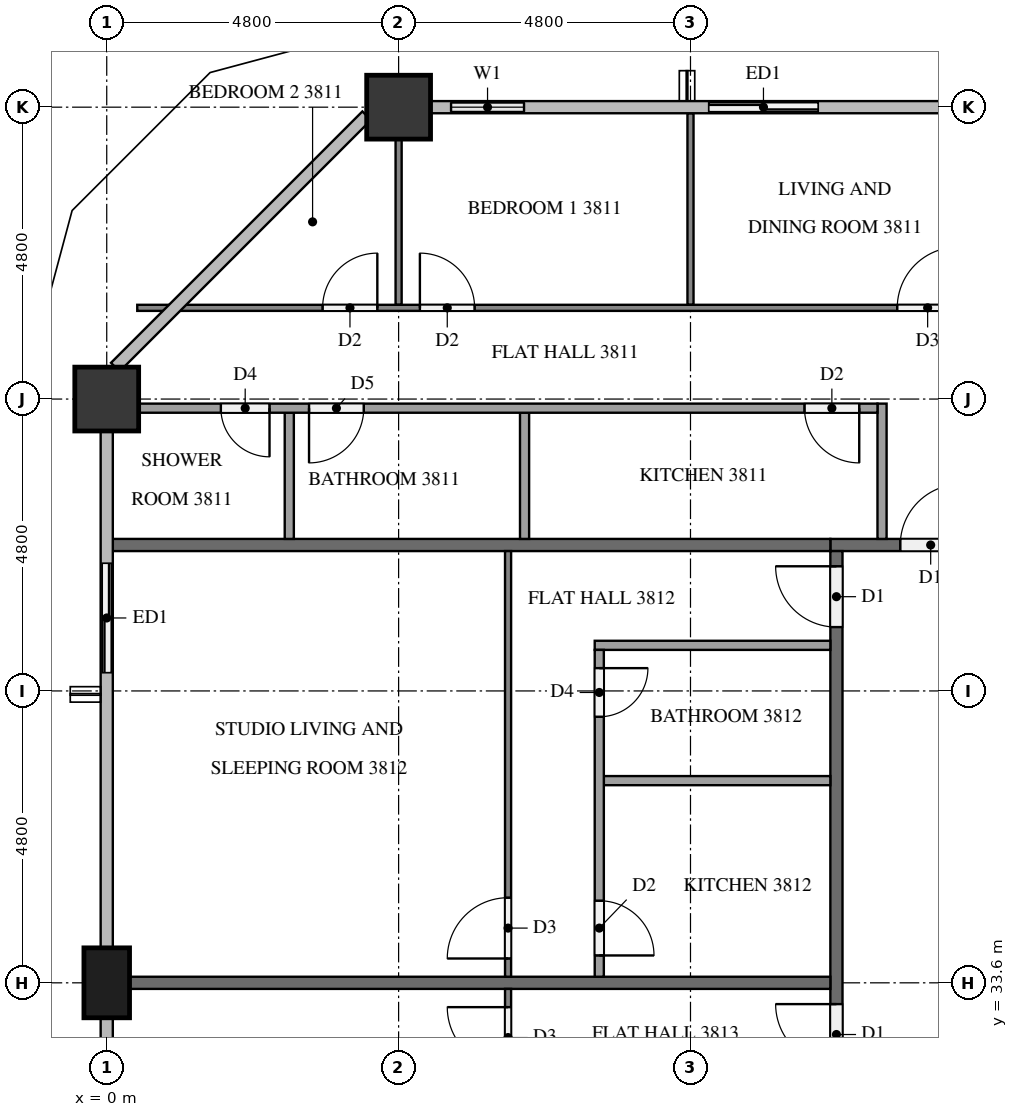
"""IFC4 building model, lengths in metres.
Left out: names, types, materials, properties, quantities, classifications, styles, units other than length and angle.
Written with IfcOpenShell. Run it as: python <this file> out.ifc"""

import sys

from ifc_helpers import new_model, si_unit, direction, frame, frame_2d, origin, origin_2d, place, context, subcontext, project, spatial, rectangle, extrude, element, fill, save


model = new_model("IFC4")
c1 = context("Model", 3, precision=1e-05, world=origin(), true_north=direction((0.0, 1.0)))
c2 = subcontext(c1, "Body", "Model", "MODEL_VIEW")
j1 = project(units=[si_unit("LENGTHUNIT", "METRE"), si_unit("PLANEANGLEUNIT", "RADIAN")], contexts=[c1])
p1 = place(None, origin())
s1 = spatial("IfcSite", under=j1, at=p1, CompositionType="ELEMENT")
p2 = place(p1, origin())
s2 = spatial("IfcBuilding", under=s1, at=p2, CompositionType="ELEMENT")
p3 = place(p2, frame((0.0, 0.0, 149.0)))
s3 = spatial("IfcBuildingStorey", under=s2, at=p3, CompositionType="ELEMENT", Elevation=149.0)
for number, where, z_axis, x_axis in (
    (1, (4.8, 48.0, 0.0), (0.0, 0.0, 1.0), (1.0, 0.0, 0.0)),
    (2, (0.0, 43.2, 0.0), (0.0, 0.0, 1.0), (1.0, 0.0, 0.0)),
):
    element("IfcColumn", number, at=place(p3, frame(where, z_axis=z_axis, x_axis=x_axis)), inside=s3, PredefinedType="COLUMN", context=c2, shape_type="SweptSolid", body=[
        extrude(rectangle(XDim=1.05, YDim=1.05, at=origin_2d()), origin(), (0.0, 0.0, 1.0), 3.2),
    ])
p4 = place(p3, frame((0.0, 33.6, 0.0), z_axis=(0.0, 0.0, 1.0), x_axis=(0.0, 1.0, 0.0)))
e3 = element("IfcColumn", 3, at=p4, inside=s3, PredefinedType="COLUMN", context=c2, shape_type="SweptSolid", body=[
    extrude(rectangle(XDim=1.15, YDim=0.75, at=origin_2d()), origin(), (0.0, 0.0, 1.0), 3.2),
])
p5 = place(p3, frame((12.0, 48.0, 0.0), z_axis=(0.0, 0.0, 1.0), x_axis=(-1.0, 0.0, 0.0)))
e4 = element("IfcWall", 4, at=p5, inside=s3, PredefinedType="SOLIDWALL", context=c2, shape_type="SweptSolid", body=[
    extrude(rectangle(XDim=2.4, YDim=0.15, at=frame_2d((1.2, 0.0))), origin(), (0.0, 0.0, 1.0), 3.2),
])
p6 = place(p5, frame((0.3, 0.0, 0.0)))
e5 = element("IfcOpeningElement", 5, at=p6, cuts=e4, PredefinedType="OPENING", context=c2, shape_type="SweptSolid", body=[
    extrude(rectangle(XDim=1.8, YDim=2.4, at=frame_2d((0.9, 1.2))), frame((0.0, 0.085, 0.0), z_axis=(0.0, -1.0, 0.0), x_axis=(1.0, 0.0, 0.0)), (0.0, 0.0, 1.0), 0.17),
])
p7 = place(p3, frame((7.2, 48.0, 0.0), z_axis=(0.0, 0.0, 1.0), x_axis=(-1.0, 0.0, 0.0)))
e6 = element("IfcWall", 6, at=p7, inside=s3, PredefinedType="SOLIDWALL", context=c2, shape_type="SweptSolid", body=[
    extrude(rectangle(XDim=1.875, YDim=0.15, at=frame_2d((0.938, 0.0))), origin(), (0.0, 0.0, 1.0), 3.2),
])
p8 = place(p7, frame((0.337, 0.0, 0.9)))
e7 = element("IfcOpeningElement", 7, at=p8, cuts=e6, PredefinedType="OPENING", context=c2, shape_type="SweptSolid", body=[
    extrude(rectangle(XDim=1.2, YDim=1.4, at=frame_2d((0.6, 0.7))), frame((0.0, 0.085, 0.0), z_axis=(0.0, -1.0, 0.0), x_axis=(1.0, 0.0, 0.0)), (0.0, 0.0, 1.0), 0.17),
])
p9 = place(p3, frame((0.0, 40.8, 0.0), z_axis=(0.0, 0.0, 1.0), x_axis=(0.0, -1.0, 0.0)))
e8 = element("IfcWall", 8, at=p9, inside=s3, PredefinedType="SOLIDWALL", context=c2, shape_type="SweptSolid", body=[
    extrude(rectangle(XDim=2.4, YDim=0.15, at=frame_2d((1.2, 0.0))), origin(), (0.0, 0.0, 1.0), 3.2),
])
p10 = place(p9, frame((0.3, 0.0, 0.0)))
e9 = element("IfcOpeningElement", 9, at=p10, cuts=e8, PredefinedType="OPENING", context=c2, shape_type="SweptSolid", body=[
    extrude(rectangle(XDim=1.8, YDim=2.4, at=frame_2d((0.9, 1.2))), frame((0.0, 0.085, 0.0), z_axis=(0.0, -1.0, 0.0), x_axis=(1.0, 0.0, 0.0)), (0.0, 0.0, 1.0), 0.17),
])
p11 = place(p3, frame((11.9, 40.8, 0.0), z_axis=(0.0, 0.0, 1.0), x_axis=(1.0, 0.0, 0.0)))
e10 = element("IfcWall", 10, at=p11, inside=s3, PredefinedType="PARTITIONING", context=c2, shape_type="SweptSolid", body=[
    extrude(rectangle(XDim=38.6, YDim=0.2, at=frame_2d((19.3, 0.0))), origin(), (0.0, 0.0, 1.0), 3.2),
])
p12 = place(p11, frame((31.65, 0.0, 0.0)))
e11 = element("IfcOpeningElement", 11, at=p12, cuts=e10, PredefinedType="OPENING", context=c2, shape_type="SweptSolid", body=[
    extrude(rectangle(XDim=1.0, YDim=2.1, at=frame_2d((0.5, 1.05))), frame((0.0, 0.11, 0.0), z_axis=(0.0, -1.0, 0.0), x_axis=(1.0, 0.0, 0.0)), (0.0, 0.0, 1.0), 0.22),
])
p13 = place(p11, frame((29.95, 0.0, 0.0)))
e12 = element("IfcOpeningElement", 12, at=p13, cuts=e10, PredefinedType="OPENING", context=c2, shape_type="SweptSolid", body=[
    extrude(rectangle(XDim=1.0, YDim=2.1, at=frame_2d((0.5, 1.05))), frame((0.0, 0.11, 0.0), z_axis=(0.0, -1.0, 0.0), x_axis=(1.0, 0.0, 0.0)), (0.0, 0.0, 1.0), 0.22),
])
p14 = place(p11, frame((15.55, 0.0, 0.0)))
e13 = element("IfcOpeningElement", 13, at=p14, cuts=e10, PredefinedType="OPENING", context=c2, shape_type="SweptSolid", body=[
    extrude(rectangle(XDim=1.0, YDim=2.1, at=frame_2d((0.5, 1.05))), frame((0.0, 0.11, 0.0), z_axis=(0.0, -1.0, 0.0), x_axis=(1.0, 0.0, 0.0)), (0.0, 0.0, 1.0), 0.22),
])
p15 = place(p11, frame((1.15, 0.0, 0.0)))
e14 = element("IfcOpeningElement", 14, at=p15, cuts=e10, PredefinedType="OPENING", context=c2, shape_type="SweptSolid", body=[
    extrude(rectangle(XDim=1.0, YDim=2.1, at=frame_2d((0.5, 1.05))), frame((0.0, 0.11, 0.0), z_axis=(0.0, -1.0, 0.0), x_axis=(1.0, 0.0, 0.0)), (0.0, 0.0, 1.0), 0.22),
])
p16 = place(p3, frame((12.0, 12.1, 0.0), z_axis=(0.0, 0.0, 1.0), x_axis=(0.0, 1.0, 0.0)))
e15 = element("IfcWall", 15, at=p16, inside=s3, PredefinedType="PARTITIONING", context=c2, shape_type="SweptSolid", body=[
    extrude(rectangle(XDim=28.6, YDim=0.2, at=frame_2d((14.3, 0.0))), origin(), (0.0, 0.0, 1.0), 3.2),
])
p17 = place(p16, frame((27.35, 0.0, 0.0)))
e16 = element("IfcOpeningElement", 16, at=p17, cuts=e15, PredefinedType="OPENING", context=c2, shape_type="SweptSolid", body=[
    extrude(rectangle(XDim=1.0, YDim=2.1, at=frame_2d((0.5, 1.05))), frame((0.0, 0.11, 0.0), z_axis=(0.0, -1.0, 0.0), x_axis=(1.0, 0.0, 0.0)), (0.0, 0.0, 1.0), 0.22),
])
p18 = place(p16, frame((20.15, 0.0, 0.0)))
e17 = element("IfcOpeningElement", 17, at=p18, cuts=e15, PredefinedType="OPENING", context=c2, shape_type="SweptSolid", body=[
    extrude(rectangle(XDim=1.0, YDim=2.1, at=frame_2d((0.5, 1.05))), frame((0.0, 0.11, 0.0), z_axis=(0.0, -1.0, 0.0), x_axis=(1.0, 0.0, 0.0)), (0.0, 0.0, 1.0), 0.22),
])
p19 = place(p16, frame((10.55, 0.0, 0.0)))
e18 = element("IfcOpeningElement", 18, at=p19, cuts=e15, PredefinedType="OPENING", context=c2, shape_type="SweptSolid", body=[
    extrude(rectangle(XDim=1.0, YDim=2.1, at=frame_2d((0.5, 1.05))), frame((0.0, 0.11, 0.0), z_axis=(0.0, -1.0, 0.0), x_axis=(1.0, 0.0, 0.0)), (0.0, 0.0, 1.0), 0.22),
])
p20 = place(p3, frame((0.1, 40.8, 0.0), z_axis=(0.0, 0.0, 1.0), x_axis=(1.0, 0.0, 0.0)))
e19 = element("IfcWall", 19, at=p20, inside=s3, PredefinedType="PARTITIONING", context=c2, shape_type="SweptSolid", body=[
    extrude(rectangle(XDim=11.8, YDim=0.2, at=frame_2d((5.9, 0.0))), origin(), (0.0, 0.0, 1.0), 3.2),
])
p21 = place(p3, frame((0.375, 33.6, 0.0), z_axis=(0.0, 0.0, 1.0), x_axis=(1.0, 0.0, 0.0)))
e20 = element("IfcWall", 20, at=p21, inside=s3, PredefinedType="PARTITIONING", context=c2, shape_type="SweptSolid", body=[
    extrude(rectangle(XDim=11.525, YDim=0.2, at=frame_2d((5.762, 0.0))), origin(), (0.0, 0.0, 1.0), 3.2),
])
p22 = place(p3, frame((9.6, 44.75, 0.0), z_axis=(0.0, 0.0, 1.0), x_axis=(0.0, 1.0, 0.0)))
e21 = element("IfcWall", 21, at=p22, inside=s3, PredefinedType="PARTITIONING", context=c2, shape_type="SweptSolid", body=[
    extrude(rectangle(XDim=3.15, YDim=0.1, at=frame_2d((1.575, 0.0))), origin(), (0.0, 0.0, 1.0), 3.2),
])
p23 = place(p3, frame((4.8, 44.75, 0.0), z_axis=(0.0, 0.0, 1.0), x_axis=(0.0, 1.0, 0.0)))
e22 = element("IfcWall", 22, at=p23, inside=s3, PredefinedType="PARTITIONING", context=c2, shape_type="SweptSolid", body=[
    extrude(rectangle(XDim=2.725, YDim=0.1, at=frame_2d((1.363, 0.0))), origin(), (0.0, 0.0, 1.0), 3.2),
])
p24 = place(p3, frame((0.502, 44.7, 0.0), z_axis=(0.0, 0.0, 1.0), x_axis=(1.0, 0.0, 0.0)))
e23 = element("IfcWall", 23, at=p24, inside=s3, PredefinedType="PARTITIONING", context=c2, shape_type="SweptSolid", body=[
    extrude(rectangle(XDim=13.798, YDim=0.1, at=frame_2d((6.899, 0.0))), origin(), (0.0, 0.0, 1.0), 3.2),
])
p25 = place(p24, frame((12.498, 0.0, 0.0)))
e24 = element("IfcOpeningElement", 24, at=p25, cuts=e23, PredefinedType="OPENING", context=c2, shape_type="SweptSolid", body=[
    extrude(rectangle(XDim=1.0, YDim=2.1, at=frame_2d((0.5, 1.05))), frame((0.0, 0.06, 0.0), z_axis=(0.0, -1.0, 0.0), x_axis=(1.0, 0.0, 0.0)), (0.0, 0.0, 1.0), 0.12),
])
p26 = place(p24, frame((4.648, 0.0, 0.0)))
e25 = element("IfcOpeningElement", 25, at=p26, cuts=e23, PredefinedType="OPENING", context=c2, shape_type="SweptSolid", body=[
    extrude(rectangle(XDim=0.9, YDim=2.1, at=frame_2d((0.45, 1.05))), frame((0.0, 0.06, 0.0), z_axis=(0.0, -1.0, 0.0), x_axis=(1.0, 0.0, 0.0)), (0.0, 0.0, 1.0), 0.12),
])
p27 = place(p24, frame((3.048, 0.0, 0.0)))
e26 = element("IfcOpeningElement", 26, at=p27, cuts=e23, PredefinedType="OPENING", context=c2, shape_type="SweptSolid", body=[
    extrude(rectangle(XDim=0.9, YDim=2.1, at=frame_2d((0.45, 1.05))), frame((0.0, 0.06, 0.0), z_axis=(0.0, -1.0, 0.0), x_axis=(1.0, 0.0, 0.0)), (0.0, 0.0, 1.0), 0.12),
])
for number, where, z_axis, x_axis in (
    (27, (6.871, 40.9, 0.0), (0.0, 0.0, 1.0), (0.0, 1.0, 0.0)),
    (28, (3.002, 40.9, 0.0), (0.0, 0.0, 1.0), (0.0, 1.0, 0.0)),
):
    element("IfcWall", number, at=place(p3, frame(where, z_axis=z_axis, x_axis=x_axis)), inside=s3, PredefinedType="PARTITIONING", context=c2, shape_type="SweptSolid", body=[
        extrude(rectangle(XDim=2.075, YDim=0.15, at=frame_2d((1.038, 0.0))), origin(), (0.0, 0.0, 1.0), 3.2),
    ])
p28 = place(p3, frame((12.75, 40.9, 0.0), z_axis=(0.0, 0.0, 1.0), x_axis=(0.0, 1.0, 0.0)))
e29 = element("IfcWall", 29, at=p28, inside=s3, PredefinedType="PARTITIONING", context=c2, shape_type="SweptSolid", body=[
    extrude(rectangle(XDim=2.225, YDim=0.15, at=frame_2d((1.113, 0.0))), origin(), (0.0, 0.0, 1.0), 3.2),
])
p29 = place(p3, frame((12.675, 43.05, 0.0), z_axis=(0.0, 0.0, 1.0), x_axis=(-1.0, 0.0, 0.0)))
e30 = element("IfcWall", 30, at=p29, inside=s3, PredefinedType="PARTITIONING", context=c2, shape_type="SweptSolid", body=[
    extrude(rectangle(XDim=12.15, YDim=0.15, at=frame_2d((6.075, 0.0))), origin(), (0.0, 0.0, 1.0), 3.2),
])
p30 = place(p29, frame((0.3, 0.0, 0.0)))
e31 = element("IfcOpeningElement", 31, at=p30, cuts=e30, PredefinedType="OPENING", context=c2, shape_type="SweptSolid", body=[
    extrude(rectangle(XDim=0.9, YDim=2.1, at=frame_2d((0.45, 1.05))), frame((0.0, 0.085, 0.0), z_axis=(0.0, -1.0, 0.0), x_axis=(1.0, 0.0, 0.0)), (0.0, 0.0, 1.0), 0.17),
])
p31 = place(p29, frame((8.448, 0.0, 0.0)))
e32 = element("IfcOpeningElement", 32, at=p31, cuts=e30, PredefinedType="OPENING", context=c2, shape_type="SweptSolid", body=[
    extrude(rectangle(XDim=0.9, YDim=2.1, at=frame_2d((0.45, 1.05))), frame((0.0, 0.085, 0.0), z_axis=(0.0, -1.0, 0.0), x_axis=(1.0, 0.0, 0.0)), (0.0, 0.0, 1.0), 0.17),
])
p32 = place(p29, frame((9.998, 0.0, 0.0)))
e33 = element("IfcOpeningElement", 33, at=p32, cuts=e30, PredefinedType="OPENING", context=c2, shape_type="SweptSolid", body=[
    extrude(rectangle(XDim=0.8, YDim=2.1, at=frame_2d((0.4, 1.05))), frame((0.0, 0.085, 0.0), z_axis=(0.0, -1.0, 0.0), x_axis=(1.0, 0.0, 0.0)), (0.0, 0.0, 1.0), 0.17),
])
p33 = place(p3, frame((6.6, 33.7, 0.0), z_axis=(0.0, 0.0, 1.0), x_axis=(0.0, 1.0, 0.0)))
e34 = element("IfcWall", 34, at=p33, inside=s3, PredefinedType="PARTITIONING", context=c2, shape_type="SweptSolid", body=[
    extrude(rectangle(XDim=7.0, YDim=0.1, at=frame_2d((3.5, 0.0))), origin(), (0.0, 0.0, 1.0), 3.2),
])
p34 = place(p33, frame((0.3, 0.0, 0.0)))
e35 = element("IfcOpeningElement", 35, at=p34, cuts=e34, PredefinedType="OPENING", context=c2, shape_type="SweptSolid", body=[
    extrude(rectangle(XDim=1.0, YDim=2.1, at=frame_2d((0.5, 1.05))), frame((0.0, 0.06, 0.0), z_axis=(0.0, -1.0, 0.0), x_axis=(1.0, 0.0, 0.0)), (0.0, 0.0, 1.0), 0.12),
])
p35 = place(p3, frame((11.9, 36.925, 0.0), z_axis=(0.0, 0.0, 1.0), x_axis=(-1.0, 0.0, 0.0)))
e36 = element("IfcWall", 36, at=p35, inside=s3, PredefinedType="PARTITIONING", context=c2, shape_type="SweptSolid", body=[
    extrude(rectangle(XDim=3.725, YDim=0.15, at=frame_2d((1.862, 0.0))), origin(), (0.0, 0.0, 1.0), 3.2),
])
p36 = place(p3, frame((11.9, 39.15, 0.0), z_axis=(0.0, 0.0, 1.0), x_axis=(-1.0, 0.0, 0.0)))
e37 = element("IfcWall", 37, at=p36, inside=s3, PredefinedType="PARTITIONING", context=c2, shape_type="SweptSolid", body=[
    extrude(rectangle(XDim=3.875, YDim=0.15, at=frame_2d((1.938, 0.0))), origin(), (0.0, 0.0, 1.0), 3.2),
])
p37 = place(p3, frame((8.1, 39.075, 0.0), z_axis=(0.0, 0.0, 1.0), x_axis=(0.0, -1.0, 0.0)))
e38 = element("IfcWall", 38, at=p37, inside=s3, PredefinedType="PARTITIONING", context=c2, shape_type="SweptSolid", body=[
    extrude(rectangle(XDim=5.375, YDim=0.15, at=frame_2d((2.688, 0.0))), origin(), (0.0, 0.0, 1.0), 3.2),
])
p38 = place(p37, frame((0.3, 0.0, 0.0)))
e39 = element("IfcOpeningElement", 39, at=p38, cuts=e38, PredefinedType="OPENING", context=c2, shape_type="SweptSolid", body=[
    extrude(rectangle(XDim=0.8, YDim=2.1, at=frame_2d((0.4, 1.05))), frame((0.0, 0.085, 0.0), z_axis=(0.0, -1.0, 0.0), x_axis=(1.0, 0.0, 0.0)), (0.0, 0.0, 1.0), 0.17),
])
p39 = place(p37, frame((4.125, 0.0, 0.0)))
e40 = element("IfcOpeningElement", 40, at=p39, cuts=e38, PredefinedType="OPENING", context=c2, shape_type="SweptSolid", body=[
    extrude(rectangle(XDim=0.9, YDim=2.1, at=frame_2d((0.45, 1.05))), frame((0.0, 0.085, 0.0), z_axis=(0.0, -1.0, 0.0), x_axis=(1.0, 0.0, 0.0)), (0.0, 0.0, 1.0), 0.17),
])
p40 = place(p3, frame((6.6, 24.1, 0.0), z_axis=(0.0, 0.0, 1.0), x_axis=(0.0, 1.0, 0.0)))
e41 = element("IfcWall", 41, at=p40, inside=s3, PredefinedType="PARTITIONING", context=c2, shape_type="SweptSolid", body=[
    extrude(rectangle(XDim=9.4, YDim=0.1, at=frame_2d((4.7, 0.0))), origin(), (0.0, 0.0, 1.0), 3.2),
])
p41 = place(p40, frame((8.1, 0.0, 0.0)))
e42 = element("IfcOpeningElement", 42, at=p41, cuts=e41, PredefinedType="OPENING", context=c2, shape_type="SweptSolid", body=[
    extrude(rectangle(XDim=1.0, YDim=2.1, at=frame_2d((0.5, 1.05))), frame((0.0, 0.06, 0.0), z_axis=(0.0, -1.0, 0.0), x_axis=(1.0, 0.0, 0.0)), (0.0, 0.0, 1.0), 0.12),
])
p42 = place(p40, frame((0.3, 0.0, 0.0)))
e43 = element("IfcOpeningElement", 43, at=p42, cuts=e41, PredefinedType="OPENING", context=c2, shape_type="SweptSolid", body=[
    extrude(rectangle(XDim=0.9, YDim=2.1, at=frame_2d((0.45, 1.05))), frame((0.0, 0.06, 0.0), z_axis=(0.0, -1.0, 0.0), x_axis=(1.0, 0.0, 0.0)), (0.0, 0.0, 1.0), 0.12),
])
p43 = place(p6, origin())
e44 = element("IfcDoor", 44, at=p43, inside=s3, OperationType="SLIDING_TO_RIGHT", PredefinedType="DOOR", context=c2, shape_type="SweptSolid", body=[
    extrude(rectangle(XDim=1.8, YDim=2.4, at=frame_2d((0.9, 1.2))), frame((0.0, 0.025, 0.0), z_axis=(0.0, -1.0, 0.0), x_axis=(1.0, 0.0, 0.0)), (0.0, 0.0, 1.0), 0.05),
])
fill(e5, e44)
p44 = place(p8, origin())
e45 = element("IfcWindow", 45, at=p44, inside=s3, PartitioningType="SINGLE_PANEL", PredefinedType="WINDOW", context=c2, shape_type="SweptSolid", body=[
    extrude(rectangle(XDim=1.2, YDim=1.4, at=frame_2d((0.6, 0.7))), frame((0.0, 0.03, 0.0), z_axis=(0.0, -1.0, 0.0), x_axis=(1.0, 0.0, 0.0)), (0.0, 0.0, 1.0), 0.06),
])
fill(e7, e45)
p45 = place(p10, origin())
e46 = element("IfcDoor", 46, at=p45, inside=s3, OperationType="SLIDING_TO_LEFT", PredefinedType="DOOR", context=c2, shape_type="SweptSolid", body=[
    extrude(rectangle(XDim=1.8, YDim=2.4, at=frame_2d((0.9, 1.2))), frame((0.0, 0.025, 0.0), z_axis=(0.0, -1.0, 0.0), x_axis=(1.0, 0.0, 0.0)), (0.0, 0.0, 1.0), 0.05),
])
fill(e9, e46)
p46 = place(p15, origin())
e47 = element("IfcDoor", 47, at=p46, inside=s3, OperationType="SINGLE_SWING_RIGHT", PredefinedType="DOOR", context=c2, shape_type="SweptSolid", body=[
    extrude(rectangle(XDim=1.0, YDim=2.1, at=frame_2d((0.5, 1.05))), frame((0.0, 0.025, 0.0), z_axis=(0.0, -1.0, 0.0), x_axis=(1.0, 0.0, 0.0)), (0.0, 0.0, 1.0), 0.05),
])
fill(e14, e47)
p47 = place(p17, origin())
e48 = element("IfcDoor", 48, at=p47, inside=s3, OperationType="SINGLE_SWING_RIGHT", PredefinedType="DOOR", context=c2, shape_type="SweptSolid", body=[
    extrude(rectangle(XDim=1.0, YDim=2.1, at=frame_2d((0.5, 1.05))), frame((0.0, 0.025, 0.0), z_axis=(0.0, -1.0, 0.0), x_axis=(1.0, 0.0, 0.0)), (0.0, 0.0, 1.0), 0.05),
])
fill(e16, e48)
p48 = place(p18, origin())
e49 = element("IfcDoor", 49, at=p48, inside=s3, OperationType="SINGLE_SWING_RIGHT", PredefinedType="DOOR", context=c2, shape_type="SweptSolid", body=[
    extrude(rectangle(XDim=1.0, YDim=2.1, at=frame_2d((0.5, 1.05))), frame((0.0, 0.025, 0.0), z_axis=(0.0, -1.0, 0.0), x_axis=(1.0, 0.0, 0.0)), (0.0, 0.0, 1.0), 0.05),
])
fill(e17, e49)
p49 = place(p25, origin())
e50 = element("IfcDoor", 50, at=p49, inside=s3, OperationType="SINGLE_SWING_RIGHT", PredefinedType="DOOR", context=c2, shape_type="SweptSolid", body=[
    extrude(rectangle(XDim=1.0, YDim=2.1, at=frame_2d((0.5, 1.05))), frame((0.0, 0.025, 0.0), z_axis=(0.0, -1.0, 0.0), x_axis=(1.0, 0.0, 0.0)), (0.0, 0.0, 1.0), 0.05),
])
fill(e24, e50)
p50 = place(p26, origin())
e51 = element("IfcDoor", 51, at=p50, inside=s3, OperationType="SINGLE_SWING_LEFT", PredefinedType="DOOR", context=c2, shape_type="SweptSolid", body=[
    extrude(rectangle(XDim=0.9, YDim=2.1, at=frame_2d((0.45, 1.05))), frame((0.0, 0.025, 0.0), z_axis=(0.0, -1.0, 0.0), x_axis=(1.0, 0.0, 0.0)), (0.0, 0.0, 1.0), 0.05),
])
fill(e25, e51)
p51 = place(p27, origin())
e52 = element("IfcDoor", 52, at=p51, inside=s3, OperationType="SINGLE_SWING_RIGHT", PredefinedType="DOOR", context=c2, shape_type="SweptSolid", body=[
    extrude(rectangle(XDim=0.9, YDim=2.1, at=frame_2d((0.45, 1.05))), frame((0.0, 0.025, 0.0), z_axis=(0.0, -1.0, 0.0), x_axis=(1.0, 0.0, 0.0)), (0.0, 0.0, 1.0), 0.05),
])
fill(e26, e52)
p52 = place(p30, origin())
e53 = element("IfcDoor", 53, at=p52, inside=s3, OperationType="SINGLE_SWING_LEFT", PredefinedType="DOOR", context=c2, shape_type="SweptSolid", body=[
    extrude(rectangle(XDim=0.9, YDim=2.1, at=frame_2d((0.45, 1.05))), frame((0.0, 0.025, 0.0), z_axis=(0.0, -1.0, 0.0), x_axis=(1.0, 0.0, 0.0)), (0.0, 0.0, 1.0), 0.05),
])
fill(e31, e53)
p53 = place(p31, origin())
e54 = element("IfcDoor", 54, at=p53, inside=s3, OperationType="SINGLE_SWING_RIGHT", PredefinedType="DOOR", context=c2, shape_type="SweptSolid", body=[
    extrude(rectangle(XDim=0.9, YDim=2.1, at=frame_2d((0.45, 1.05))), frame((0.0, 0.025, 0.0), z_axis=(0.0, -1.0, 0.0), x_axis=(1.0, 0.0, 0.0)), (0.0, 0.0, 1.0), 0.05),
])
fill(e32, e54)
p54 = place(p32, origin())
e55 = element("IfcDoor", 55, at=p54, inside=s3, OperationType="SINGLE_SWING_LEFT", PredefinedType="DOOR", context=c2, shape_type="SweptSolid", body=[
    extrude(rectangle(XDim=0.8, YDim=2.1, at=frame_2d((0.4, 1.05))), frame((0.0, 0.025, 0.0), z_axis=(0.0, -1.0, 0.0), x_axis=(1.0, 0.0, 0.0)), (0.0, 0.0, 1.0), 0.05),
])
fill(e33, e55)
p55 = place(p34, origin())
e56 = element("IfcDoor", 56, at=p55, inside=s3, OperationType="SINGLE_SWING_LEFT", PredefinedType="DOOR", context=c2, shape_type="SweptSolid", body=[
    extrude(rectangle(XDim=1.0, YDim=2.1, at=frame_2d((0.5, 1.05))), frame((0.0, 0.025, 0.0), z_axis=(0.0, -1.0, 0.0), x_axis=(1.0, 0.0, 0.0)), (0.0, 0.0, 1.0), 0.05),
])
fill(e35, e56)
p56 = place(p38, origin())
e57 = element("IfcDoor", 57, at=p56, inside=s3, OperationType="SINGLE_SWING_LEFT", PredefinedType="DOOR", context=c2, shape_type="SweptSolid", body=[
    extrude(rectangle(XDim=0.8, YDim=2.1, at=frame_2d((0.4, 1.05))), frame((0.0, 0.025, 0.0), z_axis=(0.0, -1.0, 0.0), x_axis=(1.0, 0.0, 0.0)), (0.0, 0.0, 1.0), 0.05),
])
fill(e39, e57)
p57 = place(p39, origin())
e58 = element("IfcDoor", 58, at=p57, inside=s3, OperationType="SINGLE_SWING_RIGHT", PredefinedType="DOOR", context=c2, shape_type="SweptSolid", body=[
    extrude(rectangle(XDim=0.9, YDim=2.1, at=frame_2d((0.45, 1.05))), frame((0.0, 0.025, 0.0), z_axis=(0.0, -1.0, 0.0), x_axis=(1.0, 0.0, 0.0)), (0.0, 0.0, 1.0), 0.05),
])
fill(e40, e58)
p58 = place(p41, origin())
e59 = element("IfcDoor", 59, at=p58, inside=s3, OperationType="SINGLE_SWING_RIGHT", PredefinedType="DOOR", context=c2, shape_type="SweptSolid", body=[
    extrude(rectangle(XDim=1.0, YDim=2.1, at=frame_2d((0.5, 1.05))), frame((0.0, 0.025, 0.0), z_axis=(0.0, -1.0, 0.0), x_axis=(1.0, 0.0, 0.0)), (0.0, 0.0, 1.0), 0.05),
])
fill(e42, e59)
save(model, sys.argv[1])
